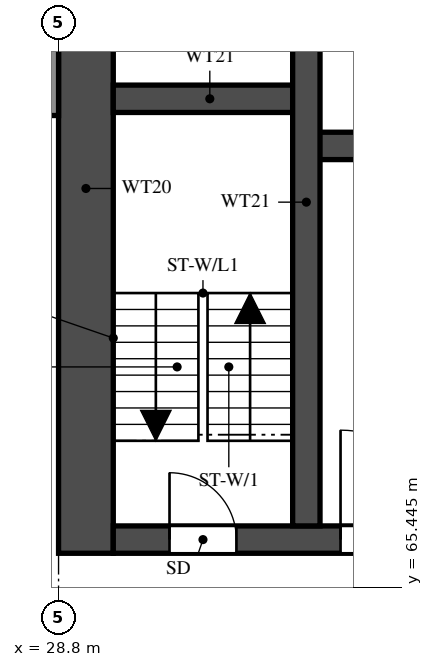
"""IFC4 building model, lengths in metres.
Left out: names, types, materials, properties, quantities, classifications, styles, units other than length and angle.
Written with IfcOpenShell. Run it as: python <this file> out.ifc"""

import sys

from ifc_helpers import new_model, si_unit, direction, frame, frame_2d, origin, place, context, subcontext, project, spatial, rectangle, extrude, element, fill, save


model = new_model("IFC4")
c1 = context("Model", 3, precision=1e-05, world=origin(), true_north=direction((0.0, 1.0)))
c2 = subcontext(c1, "Body", "Model", "MODEL_VIEW")
j1 = project(units=[si_unit("LENGTHUNIT", "METRE"), si_unit("PLANEANGLEUNIT", "RADIAN")], contexts=[c1])
p1 = place(None, origin())
s1 = spatial("IfcSite", under=j1, at=p1, CompositionType="ELEMENT")
p2 = place(p1, origin())
s2 = spatial("IfcBuilding", under=s1, at=p2, CompositionType="ELEMENT")
p3 = place(p2, frame((0.0, 0.0, 100.5)))
s3 = spatial("IfcBuildingStorey", under=s2, at=p3, CompositionType="ELEMENT", Elevation=100.5)
p4 = place(p3, frame((29.25, 66.0, 0.0), z_axis=(0.0, 0.0, 1.0), x_axis=(0.0, 1.0, 0.0)))
e1 = element("IfcWall", 1, at=p4, inside=s3, PredefinedType="SHEAR", context=c2, shape_type="SweptSolid", body=[
    extrude(rectangle(XDim=12.0, YDim=0.9, at=frame_2d((6.0, 0.0))), origin(), (0.0, 0.0, 1.0), 3.18),
])
p5 = place(p3, frame((29.7, 66.225, 0.0), z_axis=(0.0, 0.0, 1.0), x_axis=(1.0, 0.0, 0.0)))
e2 = element("IfcWall", 2, at=p5, inside=s3, PredefinedType="SHEAR", context=c2, shape_type="SweptSolid", body=[
    extrude(rectangle(XDim=41.4, YDim=0.45, at=frame_2d((20.7, 0.0))), origin(), (0.0, 0.0, 1.0), 3.18),
])
p6 = place(p5, frame((0.925, 0.0, 0.0)))
e3 = element("IfcOpeningElement", 3, at=p6, cuts=e2, PredefinedType="OPENING", context=c2, shape_type="SweptSolid", body=[
    extrude(rectangle(XDim=1.1, YDim=2.1, at=frame_2d((0.55, 1.05))), frame((0.0, 0.235, 0.0), z_axis=(0.0, -1.0, 0.0), x_axis=(1.0, 0.0, 0.0)), (0.0, 0.0, 1.0), 0.47),
])
p7 = place(p5, frame((3.738, 0.0, 0.0)))
e4 = element("IfcOpeningElement", 4, at=p7, cuts=e2, PredefinedType="OPENING", context=c2, shape_type="SweptSolid", body=[
    extrude(rectangle(XDim=1.8, YDim=2.1, at=frame_2d((0.9, 1.05))), frame((0.0, 0.235, 0.0), z_axis=(0.0, -1.0, 0.0), x_axis=(1.0, 0.0, 0.0)), (0.0, 0.0, 1.0), 0.47),
])
p8 = place(p3, frame((32.875, 72.7, 0.0), z_axis=(0.0, 0.0, 1.0), x_axis=(1.0, 0.0, 0.0)))
e5 = element("IfcWall", 5, at=p8, inside=s3, PredefinedType="SHEAR", context=c2, shape_type="SweptSolid", body=[
    extrude(rectangle(XDim=35.05, YDim=0.45, at=frame_2d((17.525, 0.0))), origin(), (0.0, 0.0, 1.0), 3.18),
])
p9 = place(p8, frame((19.8, 0.0, 0.0)))
e6 = element("IfcOpeningElement", 6, at=p9, cuts=e5, PredefinedType="OPENING", context=c2, shape_type="SweptSolid", body=[
    extrude(rectangle(XDim=1.1, YDim=2.1, at=frame_2d((0.55, 1.05))), frame((0.0, 0.235, 0.0), z_axis=(0.0, -1.0, 0.0), x_axis=(1.0, 0.0, 0.0)), (0.0, 0.0, 1.0), 0.47),
])
p10 = place(p8, frame((27.65, 0.0, 0.0)))
e7 = element("IfcOpeningElement", 7, at=p10, cuts=e5, PredefinedType="OPENING", context=c2, shape_type="SweptSolid", body=[
    extrude(rectangle(XDim=1.1, YDim=2.1, at=frame_2d((0.55, 1.05))), frame((0.0, 0.235, 0.0), z_axis=(0.0, -1.0, 0.0), x_axis=(1.0, 0.0, 0.0)), (0.0, 0.0, 1.0), 0.47),
])
p11 = place(p8, frame((30.25, 0.0, 0.0)))
e8 = element("IfcOpeningElement", 8, at=p11, cuts=e5, PredefinedType="OPENING", context=c2, shape_type="SweptSolid", body=[
    extrude(rectangle(XDim=1.1, YDim=2.1, at=frame_2d((0.55, 1.05))), frame((0.0, 0.235, 0.0), z_axis=(0.0, -1.0, 0.0), x_axis=(1.0, 0.0, 0.0)), (0.0, 0.0, 1.0), 0.47),
])
p12 = place(p8, frame((3.75, 0.0, 0.0)))
e9 = element("IfcOpeningElement", 9, at=p12, cuts=e5, PredefinedType="OPENING", context=c2, shape_type="SweptSolid", body=[
    extrude(rectangle(XDim=1.1, YDim=2.1, at=frame_2d((0.55, 1.05))), frame((0.0, 0.235, 0.0), z_axis=(0.0, -1.0, 0.0), x_axis=(1.0, 0.0, 0.0)), (0.0, 0.0, 1.0), 0.47),
])
p13 = place(p8, frame((6.5, 0.0, 0.0)))
e10 = element("IfcOpeningElement", 10, at=p13, cuts=e5, PredefinedType="OPENING", context=c2, shape_type="SweptSolid", body=[
    extrude(rectangle(XDim=1.1, YDim=2.1, at=frame_2d((0.55, 1.05))), frame((0.0, 0.235, 0.0), z_axis=(0.0, -1.0, 0.0), x_axis=(1.0, 0.0, 0.0)), (0.0, 0.0, 1.0), 0.47),
])
p14 = place(p8, frame((9.25, 0.0, 0.0)))
e11 = element("IfcOpeningElement", 11, at=p14, cuts=e5, PredefinedType="OPENING", context=c2, shape_type="SweptSolid", body=[
    extrude(rectangle(XDim=1.1, YDim=2.1, at=frame_2d((0.55, 1.05))), frame((0.0, 0.235, 0.0), z_axis=(0.0, -1.0, 0.0), x_axis=(1.0, 0.0, 0.0)), (0.0, 0.0, 1.0), 0.47),
])
p15 = place(p8, frame((12.0, 0.0, 0.0)))
e12 = element("IfcOpeningElement", 12, at=p15, cuts=e5, PredefinedType="OPENING", context=c2, shape_type="SweptSolid", body=[
    extrude(rectangle(XDim=1.1, YDim=2.1, at=frame_2d((0.55, 1.05))), frame((0.0, 0.235, 0.0), z_axis=(0.0, -1.0, 0.0), x_axis=(1.0, 0.0, 0.0)), (0.0, 0.0, 1.0), 0.47),
])
p16 = place(p8, frame((14.75, 0.0, 0.0)))
e13 = element("IfcOpeningElement", 13, at=p16, cuts=e5, PredefinedType="OPENING", context=c2, shape_type="SweptSolid", body=[
    extrude(rectangle(XDim=1.1, YDim=2.1, at=frame_2d((0.55, 1.05))), frame((0.0, 0.235, 0.0), z_axis=(0.0, -1.0, 0.0), x_axis=(1.0, 0.0, 0.0)), (0.0, 0.0, 1.0), 0.47),
])
p17 = place(p8, frame((17.5, 0.0, 0.0)))
e14 = element("IfcOpeningElement", 14, at=p17, cuts=e5, PredefinedType="OPENING", context=c2, shape_type="SweptSolid", body=[
    extrude(rectangle(XDim=1.1, YDim=2.1, at=frame_2d((0.55, 1.05))), frame((0.0, 0.235, 0.0), z_axis=(0.0, -1.0, 0.0), x_axis=(1.0, 0.0, 0.0)), (0.0, 0.0, 1.0), 0.47),
])
p18 = place(p8, frame((0.913, 0.0, 0.0)))
e15 = element("IfcOpeningElement", 15, at=p18, cuts=e5, PredefinedType="OPENING", context=c2, shape_type="SweptSolid", body=[
    extrude(rectangle(XDim=1.1, YDim=2.1, at=frame_2d((0.55, 1.05))), frame((0.0, 0.235, 0.0), z_axis=(0.0, -1.0, 0.0), x_axis=(1.0, 0.0, 0.0)), (0.0, 0.0, 1.0), 0.47),
])
p19 = place(p3, frame((29.7, 73.475, 0.0), z_axis=(0.0, 0.0, 1.0), x_axis=(1.0, 0.0, 0.0)))
e16 = element("IfcWall", 16, at=p19, inside=s3, PredefinedType="SHEAR", context=c2, shape_type="SweptSolid", body=[
    extrude(rectangle(XDim=3.175, YDim=0.45, at=frame_2d((1.587, 0.0))), origin(), (0.0, 0.0, 1.0), 3.18),
])
p20 = place(p3, frame((32.875, 66.45, 0.0), z_axis=(0.0, 0.0, 1.0), x_axis=(0.0, 1.0, 0.0)))
e17 = element("IfcWall", 17, at=p20, inside=s3, PredefinedType="SHEAR", context=c2, shape_type="SweptSolid", body=[
    extrude(rectangle(XDim=10.65, YDim=0.45, at=frame_2d((5.325, 0.0))), origin(), (0.0, 0.0, 1.0), 3.18),
])
p21 = place(p3, frame((28.7, 73.2, 0.0), z_axis=(0.0, 0.0, 1.0), x_axis=(0.0, 1.0, 0.0)))
e18 = element("IfcWall", 18, at=p21, inside=s3, PredefinedType="SOLIDWALL", context=c2, shape_type="SweptSolid", body=[
    extrude(rectangle(XDim=4.8, YDim=0.2, at=frame_2d((2.4, 0.0))), origin(), (0.0, 0.0, 1.0), 3.18),
])
p22 = place(p6, origin())
e19 = element("IfcDoor", 19, at=p22, inside=s3, OperationType="SINGLE_SWING_LEFT", PredefinedType="DOOR", context=c2, shape_type="SweptSolid", body=[
    extrude(rectangle(XDim=1.1, YDim=2.1, at=frame_2d((0.55, 1.05))), frame((0.0, 0.025, 0.0), z_axis=(0.0, -1.0, 0.0), x_axis=(1.0, 0.0, 0.0)), (0.0, 0.0, 1.0), 0.05),
])
fill(e3, e19)
p23 = place(p7, origin())
e20 = element("IfcDoor", 20, at=p23, inside=s3, OperationType="DOUBLE_DOOR_SINGLE_SWING", PredefinedType="DOOR", context=c2, shape_type="SweptSolid", body=[
    extrude(rectangle(XDim=1.8, YDim=2.1, at=frame_2d((0.9, 1.05))), frame((0.0, 0.025, 0.0), z_axis=(0.0, -1.0, 0.0), x_axis=(1.0, 0.0, 0.0)), (0.0, 0.0, 1.0), 0.05),
])
fill(e4, e20)
save(model, sys.argv[1])
